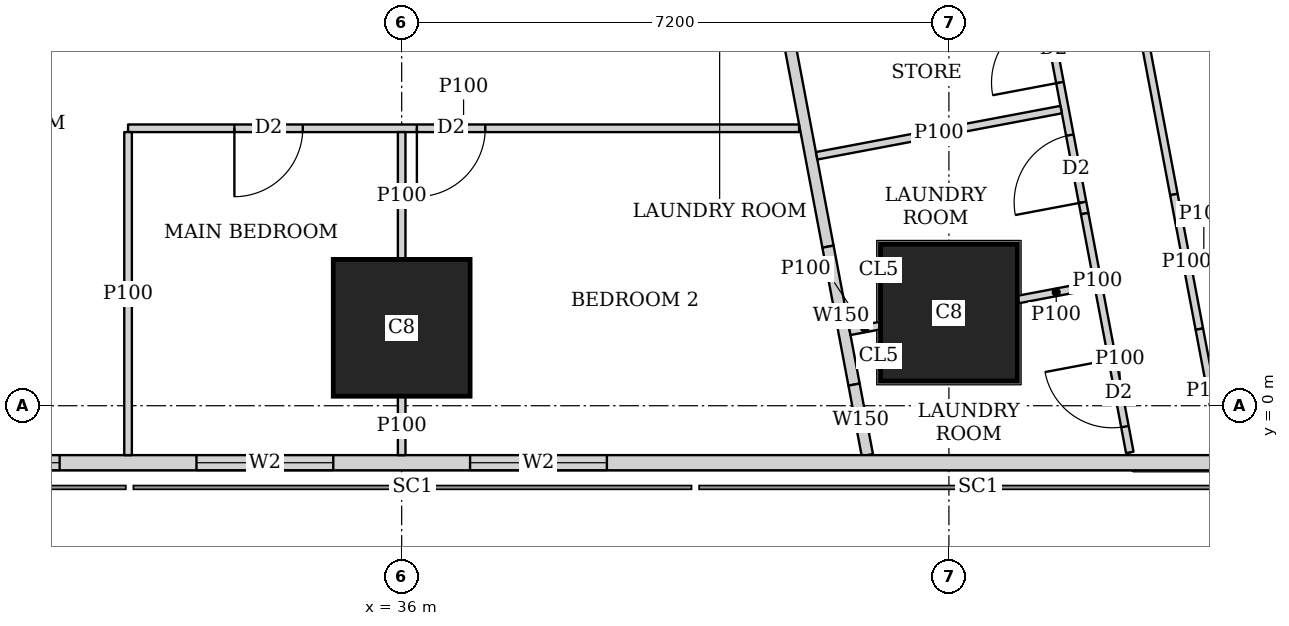
"""IFC4 building model, lengths in metres.
Left out: names, types, materials, properties, quantities, classifications, styles, units other than length and angle.
Written with IfcOpenShell. Run it as: python <this file> out.ifc"""

import sys

from ifc_helpers import new_model, si_unit, direction, frame, frame_2d, origin, origin_2d, place, context, subcontext, project, spatial, rectangle, extrude, element, fill, save


model = new_model("IFC4")
c1 = context("Model", 3, precision=1e-05, world=origin(), true_north=direction((0.0, 1.0)))
c2 = subcontext(c1, "Body", "Model", "MODEL_VIEW")
j1 = project(units=[si_unit("LENGTHUNIT", "METRE"), si_unit("PLANEANGLEUNIT", "RADIAN")], contexts=[c1])
p1 = place(None, origin())
s1 = spatial("IfcSite", under=j1, at=p1, CompositionType="ELEMENT")
p2 = place(p1, origin())
s2 = spatial("IfcBuilding", under=s1, at=p2, CompositionType="ELEMENT")
p3 = place(p2, frame((0.0, 0.0, 169.55)))
s3 = spatial("IfcBuildingStorey", under=s2, at=p3, CompositionType="ELEMENT", Elevation=169.55)
for number, where, z_axis, x_axis in (
    (1, (36.0, 1.025, 0.0), (0.0, 0.0, 1.0), (1.0, 0.0, 0.0)),
    (2, (43.2, 1.225, 0.0), (0.0, 0.0, 1.0), (1.0, 0.0, 0.0)),
):
    element("IfcColumn", number, at=place(p3, frame(where, z_axis=z_axis, x_axis=x_axis)), inside=s3, PredefinedType="COLUMN", context=c2, shape_type="SweptSolid", body=[
        extrude(rectangle(XDim=1.8, YDim=1.8, at=origin_2d()), origin(), (0.0, 0.0, 1.0), 3.75),
    ])
p4 = place(p3, frame((2.163, -0.75, 0.0), z_axis=(0.0, 0.0, 1.0), x_axis=(1.0, 0.0, 0.0)))
e3 = element("IfcWall", 3, at=p4, inside=s3, PredefinedType="SOLIDWALL", context=c2, shape_type="SweptSolid", body=[
    extrude(rectangle(XDim=45.628, YDim=0.2, at=frame_2d((22.814, 0.0))), origin(), (0.0, 0.0, 1.0), 3.5),
])
p5 = place(p4, frame((9.537, 0.0, 0.9)))
e4 = element("IfcOpeningElement", 4, at=p5, cuts=e3, PredefinedType="OPENING", context=c2, shape_type="SweptSolid", body=[
    extrude(rectangle(XDim=1.8, YDim=1.5, at=frame_2d((0.9, 0.75))), frame((0.0, 0.11, 0.0), z_axis=(0.0, -1.0, 0.0), x_axis=(1.0, 0.0, 0.0)), (0.0, 0.0, 1.0), 0.22),
])
p6 = place(p4, frame((13.137, 0.0, 0.9)))
e5 = element("IfcOpeningElement", 5, at=p6, cuts=e3, PredefinedType="OPENING", context=c2, shape_type="SweptSolid", body=[
    extrude(rectangle(XDim=1.8, YDim=1.5, at=frame_2d((0.9, 0.75))), frame((0.0, 0.11, 0.0), z_axis=(0.0, -1.0, 0.0), x_axis=(1.0, 0.0, 0.0)), (0.0, 0.0, 1.0), 0.22),
])
p7 = place(p4, frame((16.737, 0.0, 0.9)))
e6 = element("IfcOpeningElement", 6, at=p7, cuts=e3, PredefinedType="OPENING", context=c2, shape_type="SweptSolid", body=[
    extrude(rectangle(XDim=1.8, YDim=1.5, at=frame_2d((0.9, 0.75))), frame((0.0, 0.11, 0.0), z_axis=(0.0, -1.0, 0.0), x_axis=(1.0, 0.0, 0.0)), (0.0, 0.0, 1.0), 0.22),
])
p8 = place(p4, frame((20.337, 0.0, 0.9)))
e7 = element("IfcOpeningElement", 7, at=p8, cuts=e3, PredefinedType="OPENING", context=c2, shape_type="SweptSolid", body=[
    extrude(rectangle(XDim=1.8, YDim=1.5, at=frame_2d((0.9, 0.75))), frame((0.0, 0.11, 0.0), z_axis=(0.0, -1.0, 0.0), x_axis=(1.0, 0.0, 0.0)), (0.0, 0.0, 1.0), 0.22),
])
p9 = place(p4, frame((23.937, 0.0, 0.9)))
e8 = element("IfcOpeningElement", 8, at=p9, cuts=e3, PredefinedType="OPENING", context=c2, shape_type="SweptSolid", body=[
    extrude(rectangle(XDim=1.8, YDim=1.5, at=frame_2d((0.9, 0.75))), frame((0.0, 0.11, 0.0), z_axis=(0.0, -1.0, 0.0), x_axis=(1.0, 0.0, 0.0)), (0.0, 0.0, 1.0), 0.22),
])
p10 = place(p4, frame((27.537, 0.0, 0.9)))
e9 = element("IfcOpeningElement", 9, at=p10, cuts=e3, PredefinedType="OPENING", context=c2, shape_type="SweptSolid", body=[
    extrude(rectangle(XDim=1.8, YDim=1.5, at=frame_2d((0.9, 0.75))), frame((0.0, 0.11, 0.0), z_axis=(0.0, -1.0, 0.0), x_axis=(1.0, 0.0, 0.0)), (0.0, 0.0, 1.0), 0.22),
])
p11 = place(p4, frame((31.137, 0.0, 0.9)))
e10 = element("IfcOpeningElement", 10, at=p11, cuts=e3, PredefinedType="OPENING", context=c2, shape_type="SweptSolid", body=[
    extrude(rectangle(XDim=1.8, YDim=1.5, at=frame_2d((0.9, 0.75))), frame((0.0, 0.11, 0.0), z_axis=(0.0, -1.0, 0.0), x_axis=(1.0, 0.0, 0.0)), (0.0, 0.0, 1.0), 0.22),
])
p12 = place(p4, frame((34.737, 0.0, 0.9)))
e11 = element("IfcOpeningElement", 11, at=p12, cuts=e3, PredefinedType="OPENING", context=c2, shape_type="SweptSolid", body=[
    extrude(rectangle(XDim=1.8, YDim=1.5, at=frame_2d((0.9, 0.75))), frame((0.0, 0.11, 0.0), z_axis=(0.0, -1.0, 0.0), x_axis=(1.0, 0.0, 0.0)), (0.0, 0.0, 1.0), 0.22),
])
p13 = place(p3, frame((50.653, 2.703, 0.0), z_axis=(0.0, 0.0, 1.0), x_axis=(-0.185612026696, 0.982623109613, 0.0)))
e12 = element("IfcWall", 12, at=p13, inside=s3, PredefinedType="SOLIDWALL", context=c2, shape_type="SweptSolid", body=[
    extrude(rectangle(XDim=41.393, YDim=0.2, at=frame_2d((20.697, 0.0))), origin(), (0.0, 0.0, 1.0), 3.5),
])
p14 = place(p13, frame((1.633, 0.0, 0.9)))
e13 = element("IfcOpeningElement", 13, at=p14, cuts=e12, PredefinedType="OPENING", context=c2, shape_type="SweptSolid", body=[
    extrude(rectangle(XDim=1.8, YDim=1.5, at=frame_2d((0.9, 0.75))), frame((0.0, 0.11, 0.0), z_axis=(0.0, -1.0, 0.0), x_axis=(1.0, 0.0, 0.0)), (0.0, 0.0, 1.0), 0.22),
])
p15 = place(p13, frame((6.032, 0.0, 0.9)))
e14 = element("IfcOpeningElement", 14, at=p15, cuts=e12, PredefinedType="OPENING", context=c2, shape_type="SweptSolid", body=[
    extrude(rectangle(XDim=1.8, YDim=1.5, at=frame_2d((0.9, 0.75))), frame((0.0, 0.11, 0.0), z_axis=(0.0, -1.0, 0.0), x_axis=(1.0, 0.0, 0.0)), (0.0, 0.0, 1.0), 0.22),
])
p16 = place(p13, frame((9.848, 0.0, 0.9)))
e15 = element("IfcOpeningElement", 15, at=p16, cuts=e12, PredefinedType="OPENING", context=c2, shape_type="SweptSolid", body=[
    extrude(rectangle(XDim=1.8, YDim=1.5, at=frame_2d((0.9, 0.75))), frame((0.0, 0.11, 0.0), z_axis=(0.0, -1.0, 0.0), x_axis=(1.0, 0.0, 0.0)), (0.0, 0.0, 1.0), 0.22),
])
p17 = place(p13, frame((13.664, 0.0, 0.9)))
e16 = element("IfcOpeningElement", 16, at=p17, cuts=e12, PredefinedType="OPENING", context=c2, shape_type="SweptSolid", body=[
    extrude(rectangle(XDim=1.8, YDim=1.5, at=frame_2d((0.9, 0.75))), frame((0.0, 0.11, 0.0), z_axis=(0.0, -1.0, 0.0), x_axis=(1.0, 0.0, 0.0)), (0.0, 0.0, 1.0), 0.22),
])
p18 = place(p13, frame((17.481, 0.0, 0.9)))
e17 = element("IfcOpeningElement", 17, at=p18, cuts=e12, PredefinedType="OPENING", context=c2, shape_type="SweptSolid", body=[
    extrude(rectangle(XDim=1.8, YDim=1.5, at=frame_2d((0.9, 0.75))), frame((0.0, 0.11, 0.0), z_axis=(0.0, -1.0, 0.0), x_axis=(1.0, 0.0, 0.0)), (0.0, 0.0, 1.0), 0.22),
])
p19 = place(p13, frame((21.297, 0.0, 0.9)))
e18 = element("IfcOpeningElement", 18, at=p19, cuts=e12, PredefinedType="OPENING", context=c2, shape_type="SweptSolid", body=[
    extrude(rectangle(XDim=1.8, YDim=1.5, at=frame_2d((0.9, 0.75))), frame((0.0, 0.11, 0.0), z_axis=(0.0, -1.0, 0.0), x_axis=(1.0, 0.0, 0.0)), (0.0, 0.0, 1.0), 0.22),
])
p20 = place(p13, frame((25.113, 0.0, 0.9)))
e19 = element("IfcOpeningElement", 19, at=p20, cuts=e12, PredefinedType="OPENING", context=c2, shape_type="SweptSolid", body=[
    extrude(rectangle(XDim=1.8, YDim=1.5, at=frame_2d((0.9, 0.75))), frame((0.0, 0.11, 0.0), z_axis=(0.0, -1.0, 0.0), x_axis=(1.0, 0.0, 0.0)), (0.0, 0.0, 1.0), 0.22),
])
p21 = place(p13, frame((28.93, 0.0, 0.9)))
e20 = element("IfcOpeningElement", 20, at=p21, cuts=e12, PredefinedType="OPENING", context=c2, shape_type="SweptSolid", body=[
    extrude(rectangle(XDim=1.8, YDim=1.5, at=frame_2d((0.9, 0.75))), frame((0.0, 0.11, 0.0), z_axis=(0.0, -1.0, 0.0), x_axis=(1.0, 0.0, 0.0)), (0.0, 0.0, 1.0), 0.22),
])
p22 = place(p13, frame((32.746, 0.0, 0.9)))
e21 = element("IfcOpeningElement", 21, at=p22, cuts=e12, PredefinedType="OPENING", context=c2, shape_type="SweptSolid", body=[
    extrude(rectangle(XDim=1.8, YDim=1.5, at=frame_2d((0.9, 0.75))), frame((0.0, 0.11, 0.0), z_axis=(0.0, -1.0, 0.0), x_axis=(1.0, 0.0, 0.0)), (0.0, 0.0, 1.0), 0.22),
])
p23 = place(p13, frame((36.481, 0.0, 0.9)))
e22 = element("IfcOpeningElement", 22, at=p23, cuts=e12, PredefinedType="OPENING", context=c2, shape_type="SweptSolid", body=[
    extrude(rectangle(XDim=1.8, YDim=1.5, at=frame_2d((0.9, 0.75))), frame((0.0, 0.11, 0.0), z_axis=(0.0, -1.0, 0.0), x_axis=(1.0, 0.0, 0.0)), (0.0, 0.0, 1.0), 0.22),
])
p24 = place(p3, frame((33.877, 43.029, 0.0), z_axis=(0.0, 0.0, 1.0), x_axis=(0.185596841028, -0.98262597798, 0.0)))
e23 = element("IfcWall", 23, at=p24, inside=s3, PredefinedType="SOLIDWALL", context=c2, shape_type="SweptSolid", body=[
    extrude(rectangle(XDim=41.66, YDim=0.15, at=frame_2d((20.83, 0.0))), origin(), (0.0, 0.0, 1.0), 2.5),
])
p25 = place(p24, frame((8.63, 0.0, 0.0)))
e24 = element("IfcOpeningElement", 24, at=p25, cuts=e23, PredefinedType="OPENING", context=c2, shape_type="SweptSolid", body=[
    extrude(rectangle(XDim=1.0, YDim=2.1, at=frame_2d((0.5, 1.05))), frame((0.0, 0.085, 0.0), z_axis=(0.0, -1.0, 0.0), x_axis=(1.0, 0.0, 0.0)), (0.0, 0.0, 1.0), 0.17),
])
p26 = place(p24, frame((13.841, 0.0, 0.0)))
e25 = element("IfcOpeningElement", 25, at=p26, cuts=e23, PredefinedType="OPENING", context=c2, shape_type="SweptSolid", body=[
    extrude(rectangle(XDim=1.0, YDim=2.1, at=frame_2d((0.5, 1.05))), frame((0.0, 0.085, 0.0), z_axis=(0.0, -1.0, 0.0), x_axis=(1.0, 0.0, 0.0)), (0.0, 0.0, 1.0), 0.17),
])
p27 = place(p24, frame((21.474, 0.0, 0.0)))
e26 = element("IfcOpeningElement", 26, at=p27, cuts=e23, PredefinedType="OPENING", context=c2, shape_type="SweptSolid", body=[
    extrude(rectangle(XDim=1.0, YDim=2.1, at=frame_2d((0.5, 1.05))), frame((0.0, 0.085, 0.0), z_axis=(0.0, -1.0, 0.0), x_axis=(1.0, 0.0, 0.0)), (0.0, 0.0, 1.0), 0.17),
])
p28 = place(p24, frame((30.4, 0.0, 0.0)))
e27 = element("IfcOpeningElement", 27, at=p28, cuts=e23, PredefinedType="OPENING", context=c2, shape_type="SweptSolid", body=[
    extrude(rectangle(XDim=1.0, YDim=2.1, at=frame_2d((0.5, 1.05))), frame((0.0, 0.085, 0.0), z_axis=(0.0, -1.0, 0.0), x_axis=(1.0, 0.0, 0.0)), (0.0, 0.0, 1.0), 0.17),
])
p29 = place(p24, frame((32.288, 0.0, 0.0)))
e28 = element("IfcOpeningElement", 28, at=p29, cuts=e23, PredefinedType="OPENING", context=c2, shape_type="SweptSolid", body=[
    extrude(rectangle(XDim=1.0, YDim=2.1, at=frame_2d((0.5, 1.05))), frame((0.0, 0.085, 0.0), z_axis=(0.0, -1.0, 0.0), x_axis=(1.0, 0.0, 0.0)), (0.0, 0.0, 1.0), 0.17),
])
p30 = place(p3, frame((41.609, 2.093, 0.0), z_axis=(0.0, 0.0, 1.0), x_axis=(0.185708872674, -0.982604811005, 0.0)))
e29 = element("IfcWall", 29, at=p30, inside=s3, PredefinedType="SOLIDWALL", context=c2, shape_type="SweptSolid", body=[
    extrude(rectangle(XDim=1.847, YDim=0.15, at=frame_2d((0.924, 0.0))), origin(), (0.0, 0.0, 1.0), 2.1),
])
p31 = place(p3, frame((41.952, 0.278, 0.0), z_axis=(0.0, 0.0, 1.0), x_axis=(0.185365466984, -0.982669651332, 0.0)))
e30 = element("IfcWall", 30, at=p31, inside=s3, PredefinedType="SOLIDWALL", context=c2, shape_type="SweptSolid", body=[
    extrude(rectangle(XDim=0.944, YDim=0.15, at=frame_2d((0.472, 0.0))), origin(), (0.0, 0.0, 1.0), 3.5),
])
p32 = place(p3, frame((41.229, 3.65, 0.0), z_axis=(0.0, 0.0, 1.0), x_axis=(-1.0, 0.0, 0.0)))
e31 = element("IfcWall", 31, at=p32, inside=s3, PredefinedType="PARTITIONING", context=c2, shape_type="SweptSolid", body=[
    extrude(rectangle(XDim=8.829, YDim=0.1, at=frame_2d((4.415, 0.0))), origin(), (0.0, 0.0, 1.0), 3.5),
])
p33 = place(p32, frame((6.53, 0.0, 0.0)))
e32 = element("IfcOpeningElement", 32, at=p33, cuts=e31, PredefinedType="OPENING", context=c2, shape_type="SweptSolid", body=[
    extrude(rectangle(XDim=0.9, YDim=2.1, at=frame_2d((0.45, 1.05))), frame((0.0, 0.06, 0.0), z_axis=(0.0, -1.0, 0.0), x_axis=(1.0, 0.0, 0.0)), (0.0, 0.0, 1.0), 0.12),
])
p34 = place(p32, frame((4.129, 0.0, 0.0)))
e33 = element("IfcOpeningElement", 33, at=p34, cuts=e31, PredefinedType="OPENING", context=c2, shape_type="SweptSolid", body=[
    extrude(rectangle(XDim=0.9, YDim=2.1, at=frame_2d((0.45, 1.05))), frame((0.0, 0.06, 0.0), z_axis=(0.0, -1.0, 0.0), x_axis=(1.0, 0.0, 0.0)), (0.0, 0.0, 1.0), 0.12),
])
p35 = place(p3, frame((32.4, -0.65, 0.0), z_axis=(0.0, 0.0, 1.0), x_axis=(0.0, 1.0, 0.0)))
e34 = element("IfcWall", 34, at=p35, inside=s3, PredefinedType="PARTITIONING", context=c2, shape_type="SweptSolid", body=[
    extrude(rectangle(XDim=4.25, YDim=0.1, at=frame_2d((2.125, 0.0))), origin(), (0.0, 0.0, 1.0), 2.1),
])
p36 = place(p3, frame((36.0, -0.65, 0.0), z_axis=(0.0, 0.0, 1.0), x_axis=(0.0, 1.0, 0.0)))
e35 = element("IfcWall", 35, at=p36, inside=s3, PredefinedType="PARTITIONING", context=c2, shape_type="SweptSolid", body=[
    extrude(rectangle(XDim=0.774, YDim=0.1, at=frame_2d((0.387, 0.0))), origin(), (0.0, 0.0, 1.0), 3.5),
])
p37 = place(p3, frame((36.0, 1.926, 0.0), z_axis=(0.0, 0.0, 1.0), x_axis=(0.0, 1.0, 0.0)))
e36 = element("IfcWall", 36, at=p37, inside=s3, PredefinedType="PARTITIONING", context=c2, shape_type="SweptSolid", body=[
    extrude(rectangle(XDim=1.674, YDim=0.1, at=frame_2d((0.837, 0.0))), origin(), (0.0, 0.0, 1.0), 3.5),
])
p38 = place(p3, frame((44.727, 10.366, 0.0), z_axis=(0.0, 0.0, 1.0), x_axis=(0.185578957652, -0.982629355595, 0.0)))
e37 = element("IfcWall", 37, at=p38, inside=s3, PredefinedType="PARTITIONING", context=c2, shape_type="SweptSolid", body=[
    extrude(rectangle(XDim=7.721, YDim=0.1, at=frame_2d((3.86, 0.0))), origin(), (0.0, 0.0, 1.0), 3.5),
])
p39 = place(p38, frame((0.151, 0.0, 0.0)))
e38 = element("IfcOpeningElement", 38, at=p39, cuts=e37, PredefinedType="OPENING", context=c2, shape_type="SweptSolid", body=[
    extrude(rectangle(XDim=0.9, YDim=2.1, at=frame_2d((0.45, 1.05))), frame((0.0, 0.06, 0.0), z_axis=(0.0, -1.0, 0.0), x_axis=(1.0, 0.0, 0.0)), (0.0, 0.0, 1.0), 0.12),
])
p40 = place(p38, frame((3.806, 0.0, 0.0)))
e39 = element("IfcOpeningElement", 39, at=p40, cuts=e37, PredefinedType="OPENING", context=c2, shape_type="SweptSolid", body=[
    extrude(rectangle(XDim=0.9, YDim=2.1, at=frame_2d((0.45, 1.05))), frame((0.0, 0.06, 0.0), z_axis=(0.0, -1.0, 0.0), x_axis=(1.0, 0.0, 0.0)), (0.0, 0.0, 1.0), 0.12),
])
p41 = place(p3, frame((46.16, 2.779, 0.0), z_axis=(0.0, 0.0, 1.0), x_axis=(0.18597295662, -0.982554863306, 0.0)))
e40 = element("IfcWall", 40, at=p41, inside=s3, PredefinedType="PARTITIONING", context=c2, shape_type="SweptSolid", body=[
    extrude(rectangle(XDim=1.802, YDim=0.1, at=frame_2d((0.901, 0.0))), origin(), (0.0, 0.0, 1.0), 2.1),
])
p42 = place(p3, frame((46.495, 1.008, 0.0), z_axis=(0.0, 0.0, 1.0), x_axis=(0.185535059532, -0.982637645159, 0.0)))
e41 = element("IfcWall", 41, at=p42, inside=s3, PredefinedType="PARTITIONING", context=c2, shape_type="SweptSolid", body=[
    extrude(rectangle(XDim=1.644, YDim=0.1, at=frame_2d((0.822, 0.0))), origin(), (0.0, 0.0, 1.0), 3.5),
])
p43 = place(p3, frame((43.999, 7.755, 0.0), z_axis=(0.0, 0.0, 1.0), x_axis=(0.185565904578, -0.982631820703, 0.0)))
e42 = element("IfcWall", 42, at=p43, inside=s3, PredefinedType="PARTITIONING", context=c2, shape_type="SweptSolid", body=[
    extrude(rectangle(XDim=5.319, YDim=0.1, at=frame_2d((2.66, 0.0))), origin(), (0.0, 0.0, 1.0), 3.5),
])
p44 = place(p43, frame((1.0, 0.0, 0.0)))
e43 = element("IfcOpeningElement", 43, at=p44, cuts=e42, PredefinedType="OPENING", context=c2, shape_type="SweptSolid", body=[
    extrude(rectangle(XDim=0.9, YDim=2.1, at=frame_2d((0.45, 1.05))), frame((0.0, 0.06, 0.0), z_axis=(0.0, -1.0, 0.0), x_axis=(1.0, 0.0, 0.0)), (0.0, 0.0, 1.0), 0.12),
])
p45 = place(p43, frame((4.269, 0.0, 0.0)))
e44 = element("IfcOpeningElement", 44, at=p45, cuts=e42, PredefinedType="OPENING", context=c2, shape_type="SweptSolid", body=[
    extrude(rectangle(XDim=0.9, YDim=2.1, at=frame_2d((0.45, 1.05))), frame((0.0, 0.06, 0.0), z_axis=(0.0, -1.0, 0.0), x_axis=(1.0, 0.0, 0.0)), (0.0, 0.0, 1.0), 0.12),
])
p46 = place(p43, frame((2.665, 0.0, 0.0)))
e45 = element("IfcOpeningElement", 45, at=p46, cuts=e42, PredefinedType="OPENING", context=c2, shape_type="SweptSolid", body=[
    extrude(rectangle(XDim=0.9, YDim=2.1, at=frame_2d((0.45, 1.05))), frame((0.0, 0.06, 0.0), z_axis=(0.0, -1.0, 0.0), x_axis=(1.0, 0.0, 0.0)), (0.0, 0.0, 1.0), 0.12),
])
p47 = place(p3, frame((44.986, 2.528, 0.0), z_axis=(0.0, 0.0, 1.0), x_axis=(0.18584218627, -0.982579605835, 0.0)))
e46 = element("IfcWall", 46, at=p47, inside=s3, PredefinedType="PARTITIONING", context=c2, shape_type="SweptSolid", body=[
    extrude(rectangle(XDim=1.802, YDim=0.1, at=frame_2d((0.901, 0.0))), origin(), (0.0, 0.0, 1.0), 2.1),
])
p48 = place(p3, frame((45.321, 0.757, 0.0), z_axis=(0.0, 0.0, 1.0), x_axis=(0.185640562635, -0.982617718904, 0.0)))
e47 = element("IfcWall", 47, at=p48, inside=s3, PredefinedType="PARTITIONING", context=c2, shape_type="SweptSolid", body=[
    extrude(rectangle(XDim=1.395, YDim=0.1, at=frame_2d((0.698, 0.0))), origin(), (0.0, 0.0, 1.0), 3.5),
])
p49 = place(p48, frame((0.15, 0.0, 0.0)))
e48 = element("IfcOpeningElement", 48, at=p49, cuts=e47, PredefinedType="OPENING", context=c2, shape_type="SweptSolid", body=[
    extrude(rectangle(XDim=0.9, YDim=2.1, at=frame_2d((0.45, 1.05))), frame((0.0, 0.06, 0.0), z_axis=(0.0, -1.0, 0.0), x_axis=(1.0, 0.0, 0.0)), (0.0, 0.0, 1.0), 0.12),
])
p50 = place(p3, frame((46.738, 2.006, 0.0), z_axis=(0.0, 0.0, 1.0), x_axis=(-0.982820466874, -0.184564161994, 0.0)))
e49 = element("IfcWall", 49, at=p50, inside=s3, PredefinedType="PARTITIONING", context=c2, shape_type="SweptSolid", body=[
    extrude(rectangle(XDim=0.374, YDim=0.1, at=frame_2d((0.187, 0.0))), origin(), (0.0, 0.0, 1.0), 2.1),
])
p51 = place(p3, frame((45.114, 1.587, 0.0), z_axis=(0.0, 0.0, 1.0), x_axis=(-0.982567886437, -0.185904138047, 0.0)))
e50 = element("IfcWall", 50, at=p51, inside=s3, PredefinedType="PARTITIONING", context=c2, shape_type="SweptSolid", body=[
    extrude(rectangle(XDim=1.022, YDim=0.1, at=frame_2d((0.511, 0.0))), origin(), (0.0, 0.0, 1.0), 2.1),
])
p52 = place(p3, frame((42.29, 1.053, 0.0), z_axis=(0.0, 0.0, 1.0), x_axis=(-0.982830800147, -0.184509127909, 0.0)))
e51 = element("IfcWall", 51, at=p52, inside=s3, PredefinedType="PARTITIONING", context=c2, shape_type="SweptSolid", body=[
    extrude(rectangle(XDim=0.401, YDim=0.1, at=frame_2d((0.2, 0.0))), origin(), (0.0, 0.0, 1.0), 2.1),
])
p53 = place(p3, frame((44.677, 3.896, 0.0), z_axis=(0.0, 0.0, 1.0), x_axis=(-0.982610347627, -0.185679575441, 0.0)))
e52 = element("IfcWall", 52, at=p53, inside=s3, PredefinedType="PARTITIONING", context=c2, shape_type="SweptSolid", body=[
    extrude(rectangle(XDim=3.274, YDim=0.1, at=frame_2d((1.637, 0.0))), origin(), (0.0, 0.0, 1.0), 3.5),
])
p54 = place(p10, origin())
e53 = element("IfcWindow", 53, at=p54, inside=s3, PartitioningType="SINGLE_PANEL", PredefinedType="WINDOW", context=c2, shape_type="SweptSolid", body=[
    extrude(rectangle(XDim=1.8, YDim=1.5, at=frame_2d((0.9, 0.75))), frame((0.0, 0.03, 0.0), z_axis=(0.0, -1.0, 0.0), x_axis=(1.0, 0.0, 0.0)), (0.0, 0.0, 1.0), 0.06),
])
fill(e9, e53)
p55 = place(p11, origin())
e54 = element("IfcWindow", 54, at=p55, inside=s3, PartitioningType="SINGLE_PANEL", PredefinedType="WINDOW", context=c2, shape_type="SweptSolid", body=[
    extrude(rectangle(XDim=1.8, YDim=1.5, at=frame_2d((0.9, 0.75))), frame((0.0, 0.03, 0.0), z_axis=(0.0, -1.0, 0.0), x_axis=(1.0, 0.0, 0.0)), (0.0, 0.0, 1.0), 0.06),
])
fill(e10, e54)
p56 = place(p12, origin())
e55 = element("IfcWindow", 55, at=p56, inside=s3, PartitioningType="SINGLE_PANEL", PredefinedType="WINDOW", context=c2, shape_type="SweptSolid", body=[
    extrude(rectangle(XDim=1.8, YDim=1.5, at=frame_2d((0.9, 0.75))), frame((0.0, 0.03, 0.0), z_axis=(0.0, -1.0, 0.0), x_axis=(1.0, 0.0, 0.0)), (0.0, 0.0, 1.0), 0.06),
])
fill(e11, e55)
p57 = place(p33, origin())
e56 = element("IfcDoor", 56, at=p57, inside=s3, OperationType="SINGLE_SWING_RIGHT", PredefinedType="DOOR", context=c2, shape_type="SweptSolid", body=[
    extrude(rectangle(XDim=0.9, YDim=2.1, at=frame_2d((0.45, 1.05))), frame((0.0, 0.025, 0.0), z_axis=(0.0, -1.0, 0.0), x_axis=(1.0, 0.0, 0.0)), (0.0, 0.0, 1.0), 0.05),
])
fill(e32, e56)
p58 = place(p34, origin())
e57 = element("IfcDoor", 57, at=p58, inside=s3, OperationType="SINGLE_SWING_RIGHT", PredefinedType="DOOR", context=c2, shape_type="SweptSolid", body=[
    extrude(rectangle(XDim=0.9, YDim=2.1, at=frame_2d((0.45, 1.05))), frame((0.0, 0.025, 0.0), z_axis=(0.0, -1.0, 0.0), x_axis=(1.0, 0.0, 0.0)), (0.0, 0.0, 1.0), 0.05),
])
fill(e33, e57)
p59 = place(p45, origin())
e58 = element("IfcDoor", 58, at=p59, inside=s3, OperationType="SINGLE_SWING_LEFT", PredefinedType="DOOR", context=c2, shape_type="SweptSolid", body=[
    extrude(rectangle(XDim=0.9, YDim=2.1, at=frame_2d((0.45, 1.05))), frame((0.0, 0.025, 0.0), z_axis=(0.0, -1.0, 0.0), x_axis=(1.0, 0.0, 0.0)), (0.0, 0.0, 1.0), 0.05),
])
fill(e44, e58)
p60 = place(p49, origin())
e59 = element("IfcDoor", 59, at=p60, inside=s3, OperationType="SINGLE_SWING_RIGHT", PredefinedType="DOOR", context=c2, shape_type="SweptSolid", body=[
    extrude(rectangle(XDim=0.9, YDim=2.1, at=frame_2d((0.45, 1.05))), frame((0.0, 0.025, 0.0), z_axis=(0.0, -1.0, 0.0), x_axis=(1.0, 0.0, 0.0)), (0.0, 0.0, 1.0), 0.05),
])
fill(e48, e59)
p61 = place(p46, origin())
e60 = element("IfcDoor", 60, at=p61, inside=s3, OperationType="SINGLE_SWING_LEFT", PredefinedType="DOOR", context=c2, shape_type="SweptSolid", body=[
    extrude(rectangle(XDim=0.9, YDim=2.1, at=frame_2d((0.45, 1.05))), frame((0.0, 0.025, 0.0), z_axis=(0.0, -1.0, 0.0), x_axis=(1.0, 0.0, 0.0)), (0.0, 0.0, 1.0), 0.05),
])
fill(e45, e60)
save(model, sys.argv[1])
